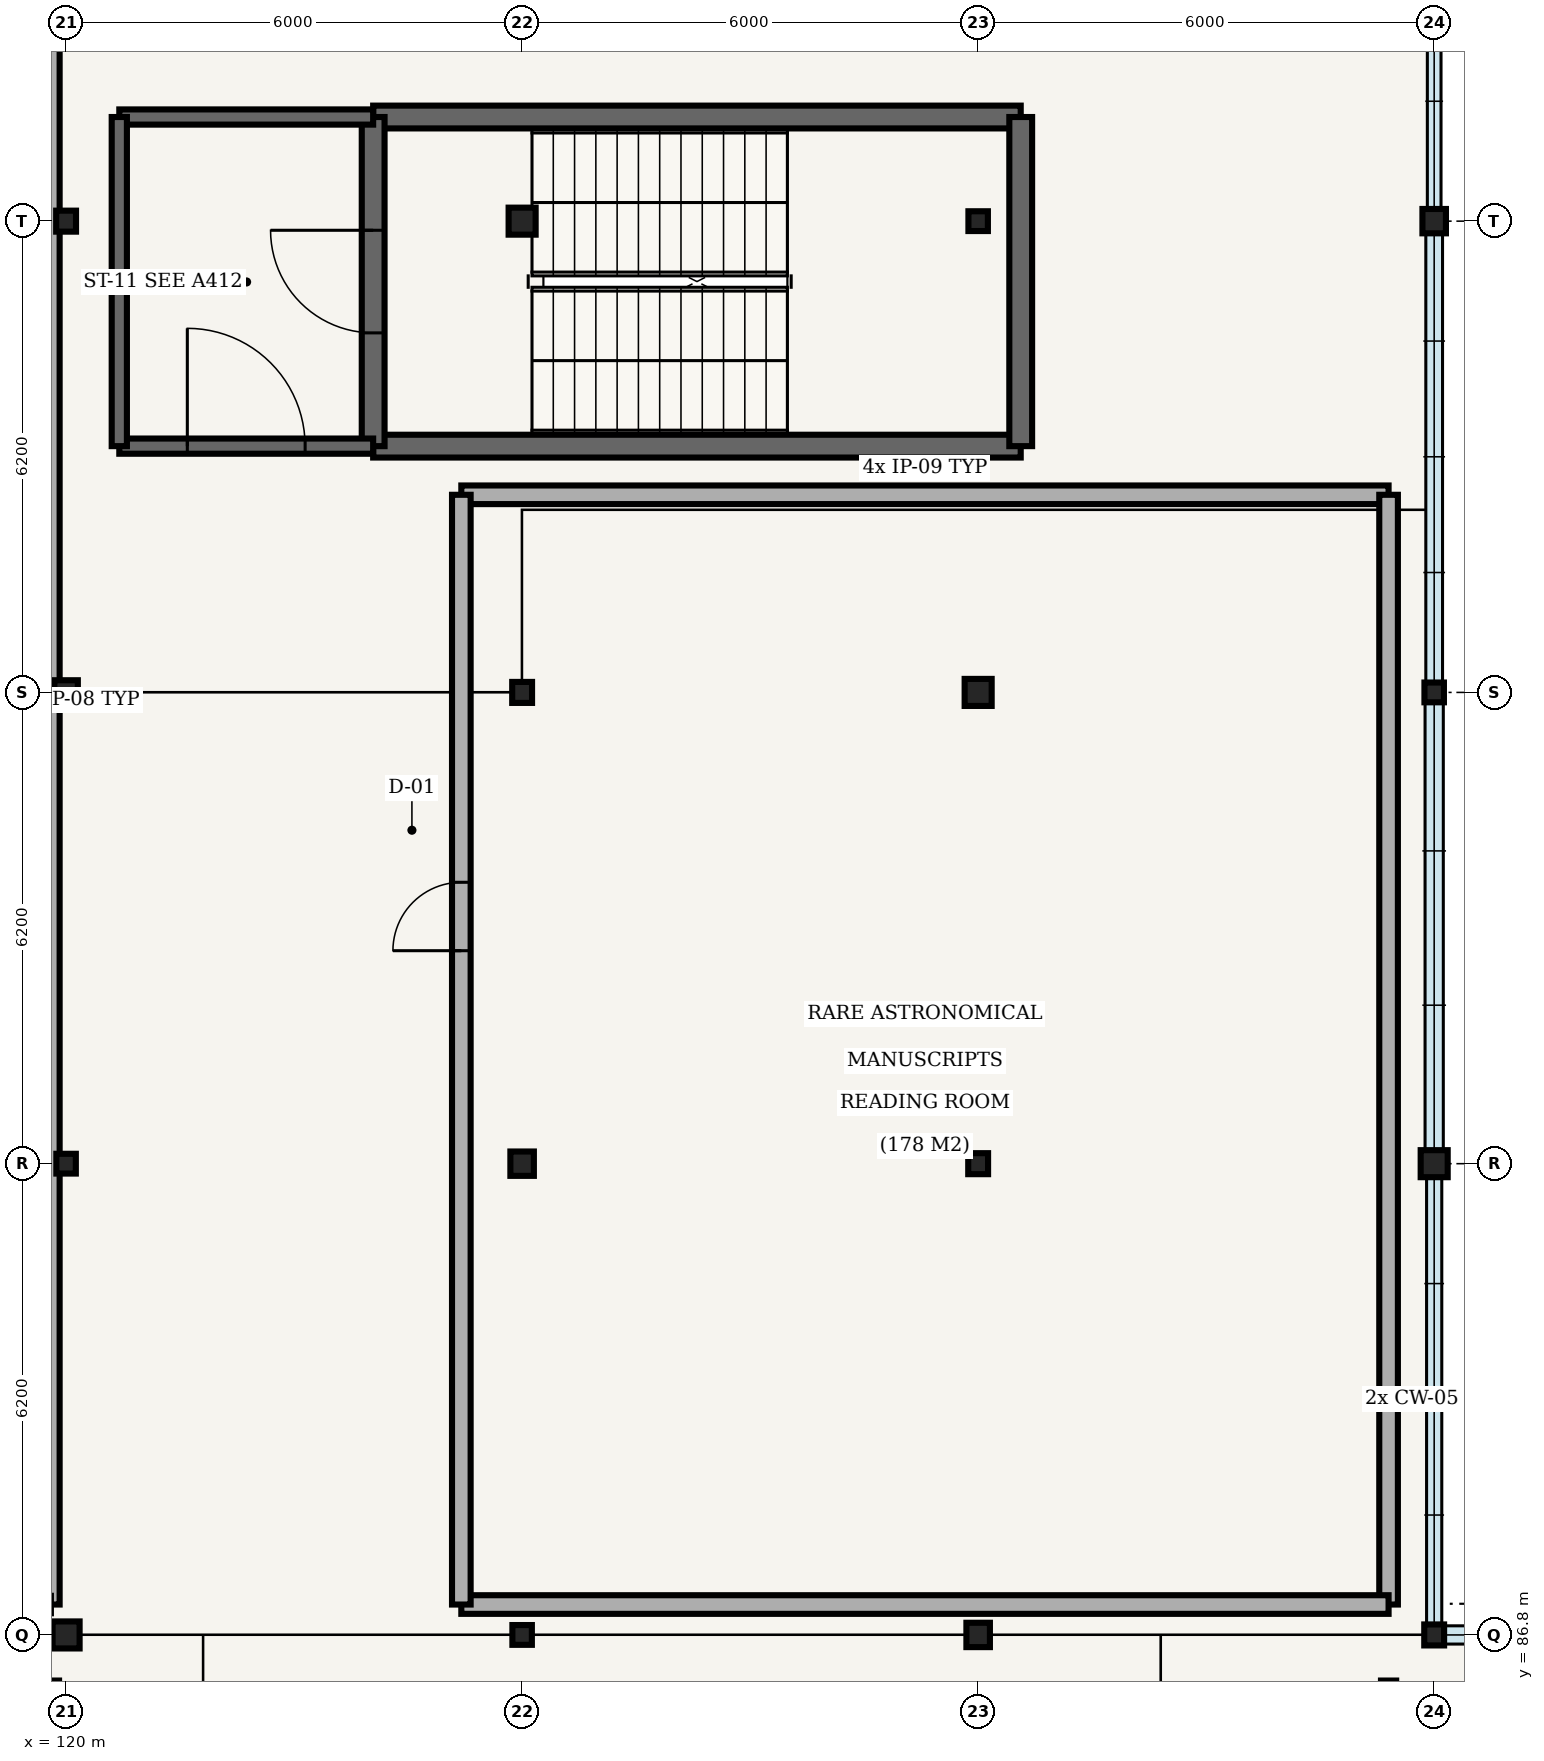
"""IFC4 building model, lengths in metres.
Left out: names, types, materials, properties, quantities, classifications, styles, units other than length and angle.
Written with IfcOpenShell. Run it as: python <this file> out.ifc"""

import sys

from ifc_helpers import new_model, si_unit, direction, frame, frame_2d, origin, origin_2d, place, context, subcontext, project, spatial, rectangle, hollow_circle, i_section, extrude, element, fill, save


model = new_model("IFC4")
c1 = context("Model", 3, precision=1e-05, world=origin(), true_north=direction((0.0, 1.0)))
c2 = subcontext(c1, "Body", "Model", "MODEL_VIEW")
j1 = project(units=[si_unit("LENGTHUNIT", "METRE"), si_unit("PLANEANGLEUNIT", "RADIAN")], contexts=[c1])
p1 = place(None, origin())
s1 = spatial("IfcSite", under=j1, at=p1, CompositionType="ELEMENT")
p2 = place(p1, origin())
s2 = spatial("IfcBuilding", under=s1, at=p2, CompositionType="ELEMENT")
p3 = place(p2, frame((0.0, 0.0, 15.6)))
s3 = spatial("IfcBuildingStorey", under=s2, at=p3, CompositionType="ELEMENT", Elevation=15.6)
p4 = place(p3, frame((120.0, 86.8, 0.0), z_axis=(0.0, 0.0, 1.0), x_axis=(1.0, 0.0, 0.0)))
e1 = element("IfcColumn", 1, at=p4, inside=s3, PredefinedType="COLUMN", context=c2, shape_type="SweptSolid", body=[
    extrude(hollow_circle(Radius=0.178, WallThickness=0.012, at=origin_2d()), origin(), (0.0, 0.0, 1.0), 4.8),
])
p5 = place(p3, frame((120.0, 93.0, 0.0), z_axis=(0.0, 0.0, 1.0), x_axis=(1.0, 0.0, 0.0)))
e2 = element("IfcColumn", 2, at=p5, inside=s3, PredefinedType="COLUMN", context=c2, shape_type="SweptSolid", body=[
    extrude(i_section(OverallWidth=0.256, OverallDepth=0.26, WebThickness=0.01, FlangeThickness=0.017, FilletRadius=0.013, at=origin_2d()), origin(), (0.0, 0.0, 1.0), 4.8),
])
p6 = place(p3, frame((120.0, 99.2, 0.0), z_axis=(0.0, 0.0, 1.0), x_axis=(1.0, 0.0, 0.0)))
e3 = element("IfcColumn", 3, at=p6, inside=s3, PredefinedType="COLUMN", context=c2, shape_type="SweptSolid", body=[
    extrude(i_section(OverallWidth=0.309, OverallDepth=0.321, WebThickness=0.014, FlangeThickness=0.022, FilletRadius=0.015, at=origin_2d()), origin(), (0.0, 0.0, 1.0), 4.8),
])
p7 = place(p3, frame((120.0, 105.4, 0.0), z_axis=(0.0, 0.0, 1.0), x_axis=(1.0, 0.0, 0.0)))
e4 = element("IfcColumn", 4, at=p7, inside=s3, PredefinedType="COLUMN", context=c2, shape_type="SweptSolid", body=[
    extrude(i_section(OverallWidth=0.261, OverallDepth=0.276, WebThickness=0.015, FlangeThickness=0.025, FilletRadius=0.013, at=origin_2d()), origin(), (0.0, 0.0, 1.0), 4.8),
])
p8 = place(p3, frame((126.0, 86.8, 0.0), z_axis=(0.0, 0.0, 1.0), x_axis=(1.0, 0.0, 0.0)))
e5 = element("IfcColumn", 5, at=p8, inside=s3, PredefinedType="COLUMN", context=c2, shape_type="SweptSolid", body=[
    extrude(i_section(OverallWidth=0.256, OverallDepth=0.26, WebThickness=0.01, FlangeThickness=0.017, FilletRadius=0.013, at=origin_2d()), origin(), (0.0, 0.0, 1.0), 4.8),
])
p9 = place(p3, frame((126.0, 93.0, 0.0), z_axis=(0.0, 0.0, 1.0), x_axis=(1.0, 0.0, 0.0)))
e6 = element("IfcColumn", 6, at=p9, inside=s3, PredefinedType="COLUMN", context=c2, shape_type="SweptSolid", body=[
    extrude(i_section(OverallWidth=0.309, OverallDepth=0.321, WebThickness=0.014, FlangeThickness=0.022, FilletRadius=0.015, at=origin_2d()), origin(), (0.0, 0.0, 1.0), 4.8),
])
p10 = place(p3, frame((126.0, 99.2, 0.0), z_axis=(0.0, 0.0, 1.0), x_axis=(1.0, 0.0, 0.0)))
e7 = element("IfcColumn", 7, at=p10, inside=s3, PredefinedType="COLUMN", context=c2, shape_type="SweptSolid", body=[
    extrude(i_section(OverallWidth=0.261, OverallDepth=0.276, WebThickness=0.015, FlangeThickness=0.025, FilletRadius=0.013, at=origin_2d()), origin(), (0.0, 0.0, 1.0), 4.8),
])
p11 = place(p3, frame((126.0, 105.4, 0.0), z_axis=(0.0, 0.0, 1.0), x_axis=(1.0, 0.0, 0.0)))
e8 = element("IfcColumn", 8, at=p11, inside=s3, PredefinedType="COLUMN", context=c2, shape_type="SweptSolid", body=[
    extrude(hollow_circle(Radius=0.178, WallThickness=0.012, at=origin_2d()), origin(), (0.0, 0.0, 1.0), 4.8),
])
p12 = place(p3, frame((132.0, 86.8, 0.0), z_axis=(0.0, 0.0, 1.0), x_axis=(1.0, 0.0, 0.0)))
e9 = element("IfcColumn", 9, at=p12, inside=s3, PredefinedType="COLUMN", context=c2, shape_type="SweptSolid", body=[
    extrude(i_section(OverallWidth=0.309, OverallDepth=0.321, WebThickness=0.014, FlangeThickness=0.022, FilletRadius=0.015, at=origin_2d()), origin(), (0.0, 0.0, 1.0), 4.8),
])
p13 = place(p3, frame((132.0, 93.0, 0.0), z_axis=(0.0, 0.0, 1.0), x_axis=(1.0, 0.0, 0.0)))
e10 = element("IfcColumn", 10, at=p13, inside=s3, PredefinedType="COLUMN", context=c2, shape_type="SweptSolid", body=[
    extrude(i_section(OverallWidth=0.261, OverallDepth=0.276, WebThickness=0.015, FlangeThickness=0.025, FilletRadius=0.013, at=origin_2d()), origin(), (0.0, 0.0, 1.0), 4.8),
])
p14 = place(p3, frame((132.0, 99.2, 0.0), z_axis=(0.0, 0.0, 1.0), x_axis=(1.0, 0.0, 0.0)))
e11 = element("IfcColumn", 11, at=p14, inside=s3, PredefinedType="COLUMN", context=c2, shape_type="SweptSolid", body=[
    extrude(hollow_circle(Radius=0.178, WallThickness=0.012, at=origin_2d()), origin(), (0.0, 0.0, 1.0), 4.8),
])
p15 = place(p3, frame((132.0, 105.4, 0.0), z_axis=(0.0, 0.0, 1.0), x_axis=(1.0, 0.0, 0.0)))
e12 = element("IfcColumn", 12, at=p15, inside=s3, PredefinedType="COLUMN", context=c2, shape_type="SweptSolid", body=[
    extrude(i_section(OverallWidth=0.256, OverallDepth=0.26, WebThickness=0.01, FlangeThickness=0.017, FilletRadius=0.013, at=origin_2d()), origin(), (0.0, 0.0, 1.0), 4.8),
])
p16 = place(p3, frame((138.0, 86.8, 0.0), z_axis=(0.0, 0.0, 1.0), x_axis=(1.0, 0.0, 0.0)))
e13 = element("IfcColumn", 13, at=p16, inside=s3, PredefinedType="COLUMN", context=c2, shape_type="SweptSolid", body=[
    extrude(i_section(OverallWidth=0.261, OverallDepth=0.276, WebThickness=0.015, FlangeThickness=0.025, FilletRadius=0.013, at=origin_2d()), origin(), (0.0, 0.0, 1.0), 4.8),
])
p17 = place(p3, frame((138.0, 93.0, 0.0), z_axis=(0.0, 0.0, 1.0), x_axis=(1.0, 0.0, 0.0)))
e14 = element("IfcColumn", 14, at=p17, inside=s3, PredefinedType="COLUMN", context=c2, shape_type="SweptSolid", body=[
    extrude(hollow_circle(Radius=0.178, WallThickness=0.012, at=origin_2d()), origin(), (0.0, 0.0, 1.0), 4.8),
])
p18 = place(p3, frame((138.0, 99.2, 0.0), z_axis=(0.0, 0.0, 1.0), x_axis=(1.0, 0.0, 0.0)))
e15 = element("IfcColumn", 15, at=p18, inside=s3, PredefinedType="COLUMN", context=c2, shape_type="SweptSolid", body=[
    extrude(i_section(OverallWidth=0.256, OverallDepth=0.26, WebThickness=0.01, FlangeThickness=0.017, FilletRadius=0.013, at=origin_2d()), origin(), (0.0, 0.0, 1.0), 4.8),
])
p19 = place(p3, frame((138.0, 105.4, 0.0), z_axis=(0.0, 0.0, 1.0), x_axis=(1.0, 0.0, 0.0)))
e16 = element("IfcColumn", 16, at=p19, inside=s3, PredefinedType="COLUMN", context=c2, shape_type="SweptSolid", body=[
    extrude(i_section(OverallWidth=0.309, OverallDepth=0.321, WebThickness=0.014, FlangeThickness=0.022, FilletRadius=0.015, at=origin_2d()), origin(), (0.0, 0.0, 1.0), 4.8),
])
for number, where, z_axis, x_axis in (
    (17, (124.04, 102.44, 0.0), (0.0, 0.0, 1.0), (1.0, 0.0, 0.0)),
    (18, (132.56, 106.77, 0.0), (0.0, 0.0, 1.0), (-1.0, 0.0, 0.0)),
):
    element("IfcWall", number, at=place(p3, frame(where, z_axis=z_axis, x_axis=x_axis)), inside=s3, PredefinedType="SHEAR", context=c2, shape_type="SweptSolid", body=[
        extrude(rectangle(XDim=8.52, YDim=0.3, at=frame_2d((4.26, 0.0))), origin(), (0.0, 0.0, 1.0), 4.55),
    ])
p20 = place(p3, frame((124.04, 106.77, 0.0), z_axis=(0.0, 0.0, 1.0), x_axis=(0.0, -1.0, 0.0)))
e19 = element("IfcWall", 19, at=p20, inside=s3, PredefinedType="SHEAR", context=c2, shape_type="SweptSolid", body=[
    extrude(rectangle(XDim=4.33, YDim=0.3, at=frame_2d((2.165, 0.0))), origin(), (0.0, 0.0, 1.0), 4.55),
])
p21 = place(p20, frame((1.49, 0.0, 0.0)))
e20 = element("IfcOpeningElement", 20, at=p21, cuts=e19, PredefinedType="OPENING", context=c2, shape_type="SweptSolid", body=[
    extrude(rectangle(XDim=1.35, YDim=2.2, at=frame_2d((0.675, 1.1))), frame((0.0, 0.16, 0.0), z_axis=(0.0, -1.0, 0.0), x_axis=(1.0, 0.0, 0.0)), (0.0, 0.0, 1.0), 0.32),
])
p22 = place(p3, frame((132.56, 102.44, 0.0), z_axis=(0.0, 0.0, 1.0), x_axis=(0.0, 1.0, 0.0)))
e21 = element("IfcWall", 21, at=p22, inside=s3, PredefinedType="SHEAR", context=c2, shape_type="SweptSolid", body=[
    extrude(rectangle(XDim=4.33, YDim=0.3, at=frame_2d((2.165, 0.0))), origin(), (0.0, 0.0, 1.0), 4.55),
])
p23 = place(p3, frame((120.7, 102.44, 0.0), z_axis=(0.0, 0.0, 1.0), x_axis=(1.0, 0.0, 0.0)))
e22 = element("IfcWall", 22, at=p23, inside=s3, PredefinedType="SHEAR", context=c2, shape_type="SweptSolid", body=[
    extrude(rectangle(XDim=3.34, YDim=0.2, at=frame_2d((1.67, 0.0))), origin(), (0.0, 0.0, 1.0), 4.55),
])
p24 = place(p23, frame((0.895, 0.0, 0.0)))
e23 = element("IfcOpeningElement", 23, at=p24, cuts=e22, PredefinedType="OPENING", context=c2, shape_type="SweptSolid", body=[
    extrude(rectangle(XDim=1.55, YDim=2.2, at=frame_2d((0.775, 1.1))), frame((0.0, 0.11, 0.0), z_axis=(0.0, -1.0, 0.0), x_axis=(1.0, 0.0, 0.0)), (0.0, 0.0, 1.0), 0.22),
])
p25 = place(p3, frame((124.04, 106.77, 0.0), z_axis=(0.0, 0.0, 1.0), x_axis=(-1.0, 0.0, 0.0)))
e24 = element("IfcWall", 24, at=p25, inside=s3, PredefinedType="SHEAR", context=c2, shape_type="SweptSolid", body=[
    extrude(rectangle(XDim=3.34, YDim=0.2, at=frame_2d((1.67, 0.0))), origin(), (0.0, 0.0, 1.0), 4.55),
])
p26 = place(p3, frame((120.7, 106.77, 0.0), z_axis=(0.0, 0.0, 1.0), x_axis=(0.0, -1.0, 0.0)))
e25 = element("IfcWall", 25, at=p26, inside=s3, PredefinedType="SHEAR", context=c2, shape_type="SweptSolid", body=[
    extrude(rectangle(XDim=4.33, YDim=0.2, at=frame_2d((2.165, 0.0))), origin(), (0.0, 0.0, 1.0), 4.55),
])
p27 = place(p3, frame((119.8, 111.0, 0.0), z_axis=(0.0, 0.0, 1.0), x_axis=(0.0, -1.0, 0.0)))
e26 = element("IfcWall", 26, at=p27, inside=s3, PredefinedType="PARTITIONING", context=c2, shape_type="SweptSolid", body=[
    extrude(rectangle(XDim=23.8, YDim=0.23, at=frame_2d((11.9, 0.0))), origin(), (0.0, 0.0, 1.0), 3.75),
])
p28 = place(p3, frame((125.2, 101.8, 0.0), z_axis=(0.0, 0.0, 1.0), x_axis=(1.0, 0.0, 0.0)))
e27 = element("IfcWall", 27, at=p28, inside=s3, PredefinedType="PARTITIONING", context=c2, shape_type="SweptSolid", body=[
    extrude(rectangle(XDim=12.2, YDim=0.245, at=frame_2d((6.1, 0.0))), origin(), (0.0, 0.0, 1.0), 3.75),
])
p29 = place(p3, frame((137.4, 101.8, 0.0), z_axis=(0.0, 0.0, 1.0), x_axis=(0.0, -1.0, 0.0)))
e28 = element("IfcWall", 28, at=p29, inside=s3, PredefinedType="PARTITIONING", context=c2, shape_type="SweptSolid", body=[
    extrude(rectangle(XDim=14.6, YDim=0.245, at=frame_2d((7.3, 0.0))), origin(), (0.0, 0.0, 1.0), 3.75),
])
p30 = place(p3, frame((137.4, 87.2, 0.0), z_axis=(0.0, 0.0, 1.0), x_axis=(-1.0, 0.0, 0.0)))
e29 = element("IfcWall", 29, at=p30, inside=s3, PredefinedType="PARTITIONING", context=c2, shape_type="SweptSolid", body=[
    extrude(rectangle(XDim=12.2, YDim=0.245, at=frame_2d((6.1, 0.0))), origin(), (0.0, 0.0, 1.0), 3.75),
])
p31 = place(p3, frame((125.2, 87.2, 0.0), z_axis=(0.0, 0.0, 1.0), x_axis=(0.0, 1.0, 0.0)))
e30 = element("IfcWall", 30, at=p31, inside=s3, PredefinedType="PARTITIONING", context=c2, shape_type="SweptSolid", body=[
    extrude(rectangle(XDim=14.6, YDim=0.245, at=frame_2d((7.3, 0.0))), origin(), (0.0, 0.0, 1.0), 3.75),
])
p32 = place(p31, frame((8.602, 0.0, 0.0)))
e31 = element("IfcOpeningElement", 31, at=p32, cuts=e30, PredefinedType="OPENING", context=c2, shape_type="SweptSolid", body=[
    extrude(rectangle(XDim=0.9, YDim=2.1, at=frame_2d((0.45, 1.05))), frame((0.0, 0.133, 0.0), z_axis=(0.0, -1.0, 0.0), x_axis=(1.0, 0.0, 0.0)), (0.0, 0.0, 1.0), 0.265),
])
p33 = place(p21, origin())
e32 = element("IfcDoor", 32, at=p33, inside=s3, OperationType="SINGLE_SWING_RIGHT", PredefinedType="DOOR", context=c2, shape_type="SweptSolid", body=[
    extrude(rectangle(XDim=1.35, YDim=2.2, at=frame_2d((0.675, 1.1))), frame((0.0, 0.025, 0.0), z_axis=(0.0, -1.0, 0.0), x_axis=(1.0, 0.0, 0.0)), (0.0, 0.0, 1.0), 0.05),
])
fill(e20, e32)
p34 = place(p24, origin())
e33 = element("IfcDoor", 33, at=p34, inside=s3, OperationType="SINGLE_SWING_LEFT", PredefinedType="DOOR", context=c2, shape_type="SweptSolid", body=[
    extrude(rectangle(XDim=1.55, YDim=2.2, at=frame_2d((0.775, 1.1))), frame((0.0, 0.025, 0.0), z_axis=(0.0, -1.0, 0.0), x_axis=(1.0, 0.0, 0.0)), (0.0, 0.0, 1.0), 0.05),
])
fill(e23, e33)
p35 = place(p32, origin())
e34 = element("IfcDoor", 34, at=p35, inside=s3, OperationType="SINGLE_SWING_LEFT", PredefinedType="DOOR", context=c2, shape_type="SweptSolid", body=[
    extrude(rectangle(XDim=0.9, YDim=2.1, at=frame_2d((0.45, 1.05))), frame((0.0, 0.025, 0.0), z_axis=(0.0, -1.0, 0.0), x_axis=(1.0, 0.0, 0.0)), (0.0, 0.0, 1.0), 0.05),
])
fill(e31, e34)
save(model, sys.argv[1])
